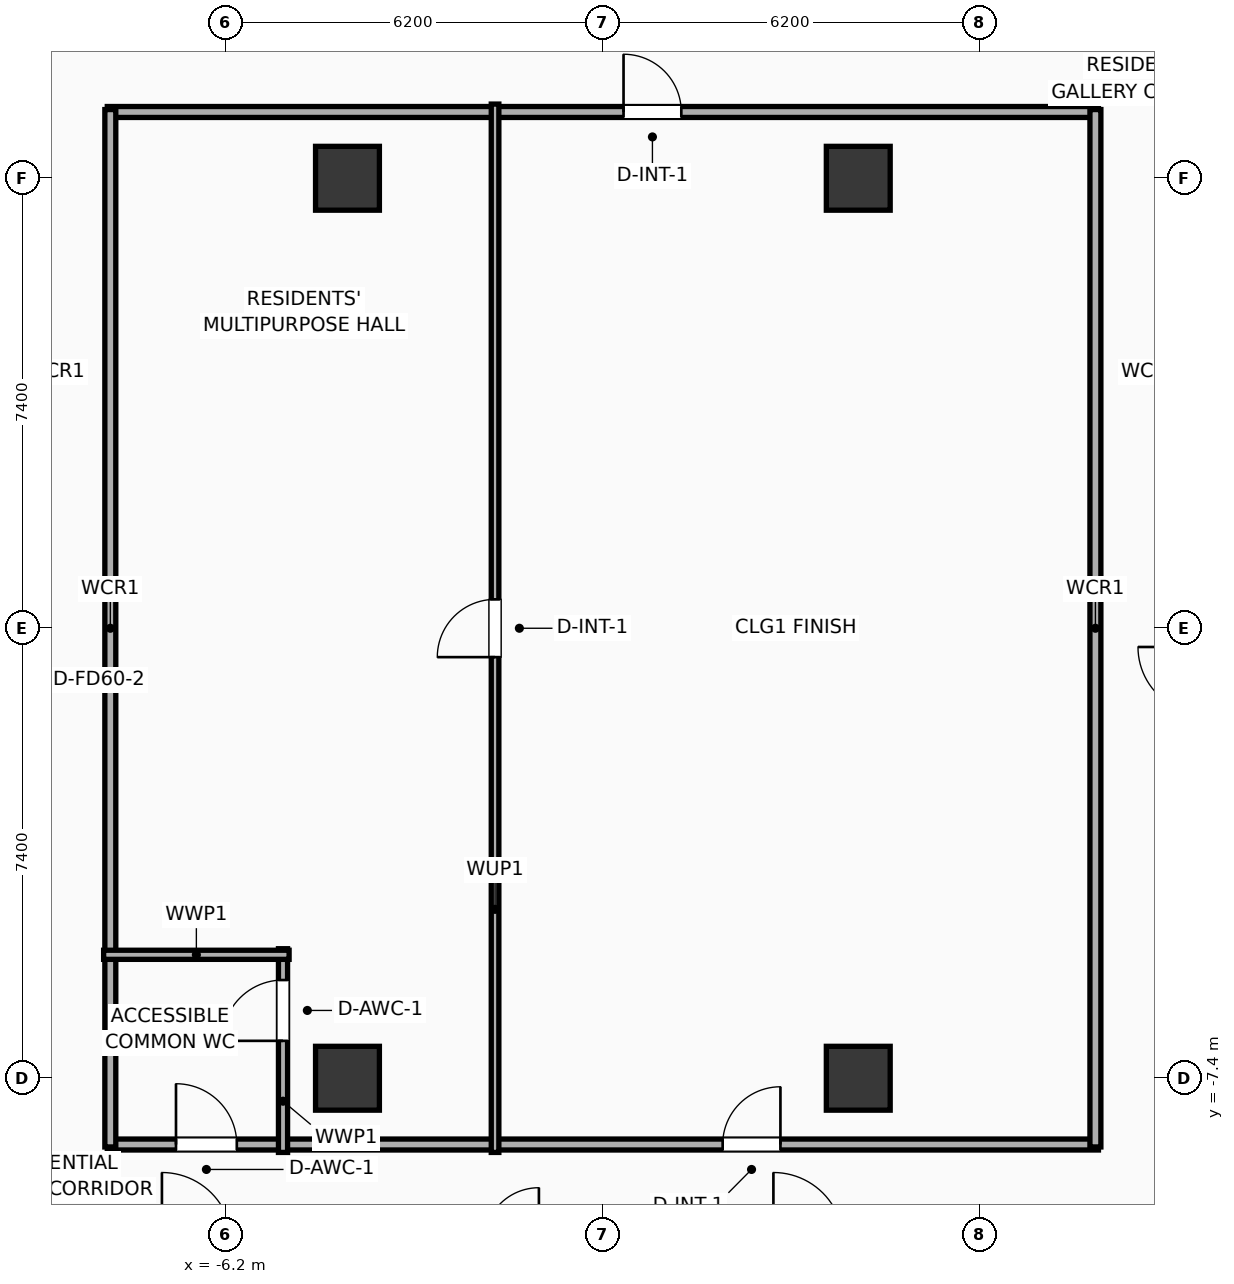
"""IFC4 building model, lengths in metres.
Left out: names, types, materials, properties, quantities, classifications, styles, units other than length and angle.
Written with IfcOpenShell. Run it as: python <this file> out.ifc"""

import sys

from ifc_helpers import new_model, si_unit, direction, frame, frame_2d, origin, origin_2d, place, context, subcontext, project, spatial, rectangle, extrude, element, fill, save


model = new_model("IFC4")
c1 = context("Model", 3, precision=1e-05, world=origin(), true_north=direction((0.0, 1.0)))
c2 = subcontext(c1, "Body", "Model", "MODEL_VIEW")
j1 = project(units=[si_unit("LENGTHUNIT", "METRE"), si_unit("PLANEANGLEUNIT", "RADIAN")], contexts=[c1])
p1 = place(None, origin())
s1 = spatial("IfcSite", under=j1, at=p1, CompositionType="ELEMENT")
p2 = place(p1, origin())
s2 = spatial("IfcBuilding", under=s1, at=p2, CompositionType="ELEMENT")
p3 = place(p2, frame((0.0, 0.0, 124.8)))
s3 = spatial("IfcBuildingStorey", under=s2, at=p3, CompositionType="ELEMENT", Elevation=124.8)
for number, where, z_axis, x_axis in (
    (1, (-4.2, -7.4, 0.0), (0.0, 0.0, 1.0), (1.0, 0.0, 0.0)),
    (2, (-4.2, 7.4, 0.0), (0.0, 0.0, 1.0), (1.0, 0.0, 0.0)),
    (3, (4.2, -7.4, 0.0), (0.0, 0.0, 1.0), (1.0, 0.0, 0.0)),
    (4, (4.2, 7.4, 0.0), (0.0, 0.0, 1.0), (1.0, 0.0, 0.0)),
):
    element("IfcColumn", number, at=place(p3, frame(where, z_axis=z_axis, x_axis=x_axis)), inside=s3, PredefinedType="COLUMN", context=c2, shape_type="SweptSolid", body=[
        extrude(rectangle(XDim=1.05, YDim=1.05, at=origin_2d()), origin(), (0.0, 0.0, 1.0), 3.9),
    ])
p4 = place(p3, frame((-8.15, 8.49, 0.0), z_axis=(0.0, 0.0, 1.0), x_axis=(1.0, 0.0, 0.0)))
e5 = element("IfcWall", 5, at=p4, inside=s3, PredefinedType="PARTITIONING", context=c2, shape_type="SweptSolid", body=[
    extrude(rectangle(XDim=16.3, YDim=0.18, at=frame_2d((8.15, 0.0))), origin(), (0.0, 0.0, 1.0), 3.65),
])
p5 = place(p4, frame((8.49, 0.0, 0.0)))
e6 = element("IfcOpeningElement", 6, at=p5, cuts=e5, PredefinedType="OPENING", context=c2, shape_type="SweptSolid", body=[
    extrude(rectangle(XDim=0.95, YDim=2.05, at=frame_2d((0.475, 1.025))), frame((0.0, 0.1, 0.0), z_axis=(0.0, -1.0, 0.0), x_axis=(1.0, 0.0, 0.0)), (0.0, 0.0, 1.0), 0.2),
])
p6 = place(p3, frame((-8.15, -8.49, 0.0), z_axis=(0.0, 0.0, 1.0), x_axis=(1.0, 0.0, 0.0)))
e7 = element("IfcWall", 7, at=p6, inside=s3, PredefinedType="PARTITIONING", context=c2, shape_type="SweptSolid", body=[
    extrude(rectangle(XDim=16.3, YDim=0.18, at=frame_2d((8.15, 0.0))), origin(), (0.0, 0.0, 1.0), 3.65),
])
p7 = place(p6, frame((1.13, 0.0, 0.0)))
e8 = element("IfcOpeningElement", 8, at=p7, cuts=e7, PredefinedType="OPENING", context=c2, shape_type="SweptSolid", body=[
    extrude(rectangle(XDim=1.0, YDim=2.05, at=frame_2d((0.5, 1.025))), frame((0.0, 0.1, 0.0), z_axis=(0.0, -1.0, 0.0), x_axis=(1.0, 0.0, 0.0)), (0.0, 0.0, 1.0), 0.2),
])
p8 = place(p6, frame((10.12, 0.0, 0.0)))
e9 = element("IfcOpeningElement", 9, at=p8, cuts=e7, PredefinedType="OPENING", context=c2, shape_type="SweptSolid", body=[
    extrude(rectangle(XDim=0.95, YDim=2.05, at=frame_2d((0.475, 1.025))), frame((0.0, 0.1, 0.0), z_axis=(0.0, -1.0, 0.0), x_axis=(1.0, 0.0, 0.0)), (0.0, 0.0, 1.0), 0.2),
])
for number, where, z_axis, x_axis in (
    (10, (-8.1, -8.53, 0.0), (0.0, 0.0, 1.0), (0.0, 1.0, 0.0)),
    (11, (8.1, -8.53, 0.0), (0.0, 0.0, 1.0), (0.0, 1.0, 0.0)),
):
    element("IfcWall", number, at=place(p3, frame(where, z_axis=z_axis, x_axis=x_axis)), inside=s3, PredefinedType="PARTITIONING", context=c2, shape_type="SweptSolid", body=[
        extrude(rectangle(XDim=17.06, YDim=0.18, at=frame_2d((8.53, 0.0))), origin(), (0.0, 0.0, 1.0), 3.65),
    ])
p9 = place(p3, frame((-5.26, -8.62, 0.0), z_axis=(0.0, 0.0, 1.0), x_axis=(0.0, 1.0, 0.0)))
e12 = element("IfcWall", 12, at=p9, inside=s3, PredefinedType="PLUMBINGWALL", context=c2, shape_type="SweptSolid", body=[
    extrude(rectangle(XDim=3.35, YDim=0.15, at=frame_2d((1.675, 0.0))), origin(), (0.0, 0.0, 1.0), 3.65),
])
p10 = place(p9, frame((1.835, 0.0, 0.0)))
e13 = element("IfcOpeningElement", 13, at=p10, cuts=e12, PredefinedType="OPENING", context=c2, shape_type="SweptSolid", body=[
    extrude(rectangle(XDim=1.0, YDim=2.05, at=frame_2d((0.5, 1.025))), frame((0.0, 0.085, 0.0), z_axis=(0.0, -1.0, 0.0), x_axis=(1.0, 0.0, 0.0)), (0.0, 0.0, 1.0), 0.17),
])
p11 = place(p3, frame((-8.21, -5.37, 0.0), z_axis=(0.0, 0.0, 1.0), x_axis=(1.0, 0.0, 0.0)))
e14 = element("IfcWall", 14, at=p11, inside=s3, PredefinedType="PLUMBINGWALL", context=c2, shape_type="SweptSolid", body=[
    extrude(rectangle(XDim=3.05, YDim=0.15, at=frame_2d((1.525, 0.0))), origin(), (0.0, 0.0, 1.0), 3.65),
])
p12 = place(p3, frame((-1.773, -8.62, 0.0), z_axis=(0.0, 0.0, 1.0), x_axis=(0.0, 1.0, 0.0)))
e15 = element("IfcWall", 15, at=p12, inside=s3, PredefinedType="PARTITIONING", context=c2, shape_type="SweptSolid", body=[
    extrude(rectangle(XDim=17.24, YDim=0.125, at=frame_2d((8.62, 0.0))), origin(), (0.0, 0.0, 1.0), 3.65),
])
p13 = place(p12, frame((8.145, 0.0, 0.0)))
e16 = element("IfcOpeningElement", 16, at=p13, cuts=e15, PredefinedType="OPENING", context=c2, shape_type="SweptSolid", body=[
    extrude(rectangle(XDim=0.95, YDim=2.05, at=frame_2d((0.475, 1.025))), frame((0.0, 0.073, 0.0), z_axis=(0.0, -1.0, 0.0), x_axis=(1.0, 0.0, 0.0)), (0.0, 0.0, 1.0), 0.145),
])
p14 = place(p5, origin())
e17 = element("IfcDoor", 17, at=p14, inside=s3, OperationType="SINGLE_SWING_LEFT", PredefinedType="DOOR", context=c2, shape_type="SweptSolid", body=[
    extrude(rectangle(XDim=0.95, YDim=2.05, at=frame_2d((0.475, 1.025))), frame((0.0, 0.025, 0.0), z_axis=(0.0, -1.0, 0.0), x_axis=(1.0, 0.0, 0.0)), (0.0, 0.0, 1.0), 0.05),
])
fill(e6, e17)
p15 = place(p7, origin())
e18 = element("IfcDoor", 18, at=p15, inside=s3, OperationType="SINGLE_SWING_LEFT", PredefinedType="DOOR", context=c2, shape_type="SweptSolid", body=[
    extrude(rectangle(XDim=1.0, YDim=2.05, at=frame_2d((0.5, 1.025))), frame((0.0, 0.025, 0.0), z_axis=(0.0, -1.0, 0.0), x_axis=(1.0, 0.0, 0.0)), (0.0, 0.0, 1.0), 0.05),
])
fill(e8, e18)
p16 = place(p8, origin())
e19 = element("IfcDoor", 19, at=p16, inside=s3, OperationType="SINGLE_SWING_RIGHT", PredefinedType="DOOR", context=c2, shape_type="SweptSolid", body=[
    extrude(rectangle(XDim=0.95, YDim=2.05, at=frame_2d((0.475, 1.025))), frame((0.0, 0.025, 0.0), z_axis=(0.0, -1.0, 0.0), x_axis=(1.0, 0.0, 0.0)), (0.0, 0.0, 1.0), 0.05),
])
fill(e9, e19)
p17 = place(p10, origin())
e20 = element("IfcDoor", 20, at=p17, inside=s3, OperationType="SINGLE_SWING_LEFT", PredefinedType="DOOR", context=c2, shape_type="SweptSolid", body=[
    extrude(rectangle(XDim=1.0, YDim=2.05, at=frame_2d((0.5, 1.025))), frame((0.0, 0.025, 0.0), z_axis=(0.0, -1.0, 0.0), x_axis=(1.0, 0.0, 0.0)), (0.0, 0.0, 1.0), 0.05),
])
fill(e13, e20)
p18 = place(p13, origin())
e21 = element("IfcDoor", 21, at=p18, inside=s3, OperationType="SINGLE_SWING_LEFT", PredefinedType="DOOR", context=c2, shape_type="SweptSolid", body=[
    extrude(rectangle(XDim=0.95, YDim=2.05, at=frame_2d((0.475, 1.025))), frame((0.0, 0.025, 0.0), z_axis=(0.0, -1.0, 0.0), x_axis=(1.0, 0.0, 0.0)), (0.0, 0.0, 1.0), 0.05),
])
fill(e16, e21)
save(model, sys.argv[1])
